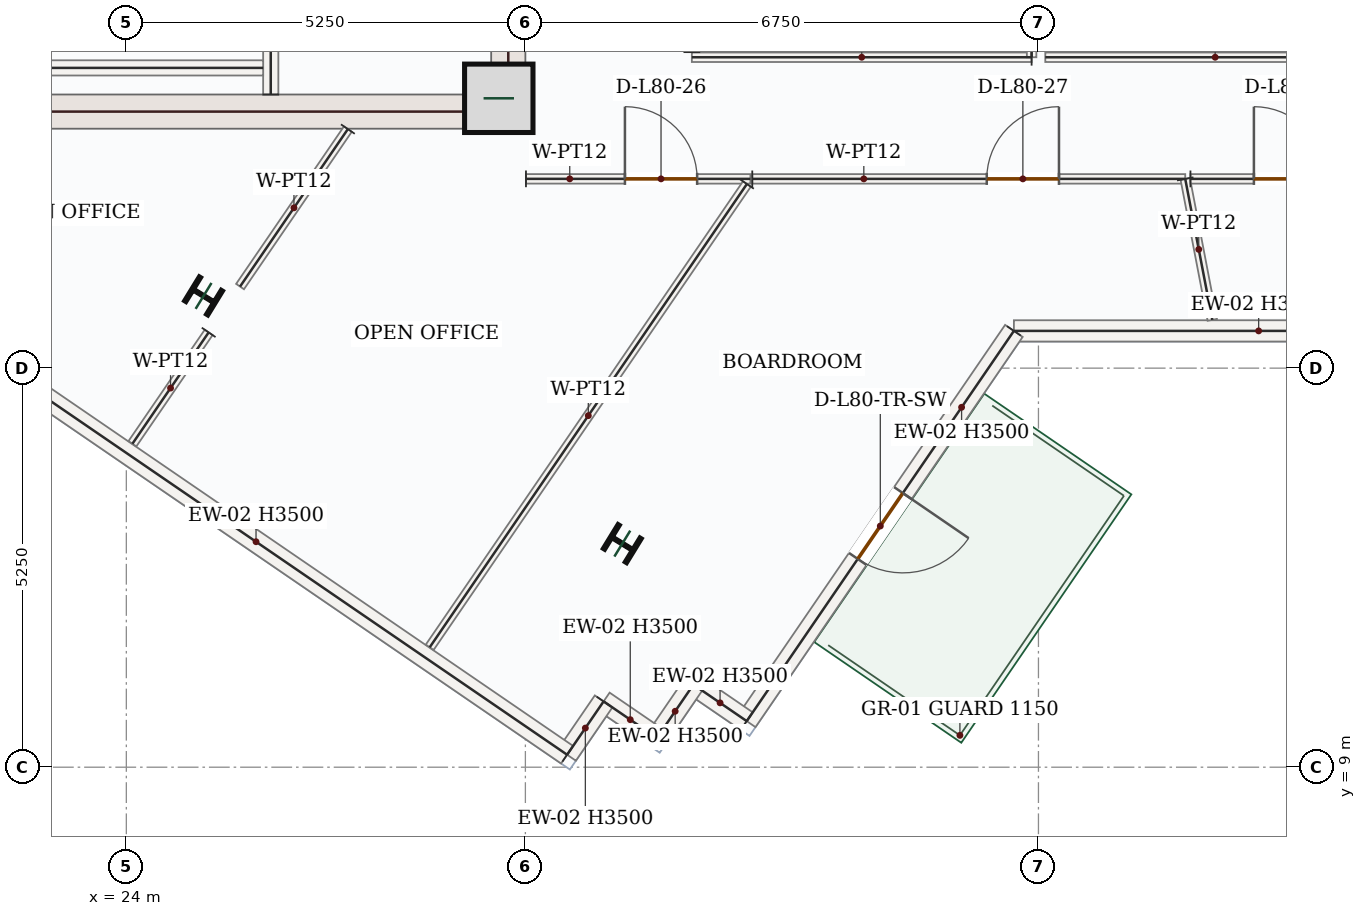
"""IFC4 building model, lengths in metres.
Left out: names, types, materials, properties, quantities, classifications, styles, units other than length and angle.
Written with IfcOpenShell. Run it as: python <this file> out.ifc"""

import sys

from ifc_helpers import new_model, si_unit, direction, frame, frame_2d, origin, origin_2d, place, context, subcontext, project, spatial, rectangle, i_section, extrude, source, transform, mapped, element, fill, save


model = new_model("IFC4")
c1 = context("Model", 3, precision=1e-05, world=origin(), true_north=direction((0.0, 1.0)))
c2 = subcontext(c1, "Body", "Model", "MODEL_VIEW")
j1 = project(units=[si_unit("LENGTHUNIT", "METRE"), si_unit("PLANEANGLEUNIT", "RADIAN")], contexts=[c1])
p1 = place(None, origin())
s1 = spatial("IfcSite", under=j1, at=p1, CompositionType="ELEMENT")
p2 = place(p1, origin())
s2 = spatial("IfcBuilding", under=s1, at=p2, CompositionType="ELEMENT")
p3 = place(p2, frame((0.0, 0.0, 331.05)))
s3 = spatial("IfcBuildingStorey", under=s2, at=p3, CompositionType="ELEMENT", Elevation=331.05)
p4 = place(p3, frame((29.025, 17.4, 0.0), z_axis=(0.0, 0.0, 1.0), x_axis=(0.0, 1.0, 0.0)))
e1 = element("IfcWall", 1, at=p4, inside=s3, PredefinedType="SHEAR", context=c2, shape_type="SweptSolid", body=[
    extrude(rectangle(XDim=8.55, YDim=0.45, at=frame_2d((4.275, 0.0))), origin(), (0.0, 0.0, 1.0), 3.5),
])
p5 = place(p4, frame((6.65, 0.0, 0.0)))
e2 = element("IfcOpeningElement", 2, at=p5, cuts=e1, PredefinedType="OPENING", context=c2, shape_type="SweptSolid", body=[
    extrude(rectangle(XDim=1.1, YDim=2.2, at=frame_2d((0.55, 1.1))), frame((0.0, 0.235, 0.0), z_axis=(0.0, -1.0, 0.0), x_axis=(1.0, 0.0, 0.0)), (0.0, 0.0, 1.0), 0.47),
])
p6 = place(p4, frame((2.15, 0.0, 0.0)))
e3 = element("IfcOpeningElement", 3, at=p6, cuts=e1, PredefinedType="OPENING", context=c2, shape_type="SweptSolid", body=[
    extrude(rectangle(XDim=0.88, YDim=2.1, at=frame_2d((0.44, 1.05))), frame((0.0, 0.235, 0.0), z_axis=(0.0, -1.0, 0.0), x_axis=(1.0, 0.0, 0.0)), (0.0, 0.0, 1.0), 0.47),
])
p7 = place(p4, frame((4.25, 0.0, 0.0)))
e4 = element("IfcOpeningElement", 4, at=p7, cuts=e1, PredefinedType="OPENING", context=c2, shape_type="SweptSolid", body=[
    extrude(rectangle(XDim=0.88, YDim=2.1, at=frame_2d((0.44, 1.05))), frame((0.0, 0.235, 0.0), z_axis=(0.0, -1.0, 0.0), x_axis=(1.0, 0.0, 0.0)), (0.0, 0.0, 1.0), 0.47),
])
m1 = source(origin(), c2, "Body", "SweptSolid", [
    extrude(rectangle(XDim=7.1, YDim=0.45, at=frame_2d((3.55, 0.0))), origin(), (0.0, 0.0, 1.0), 3.5),
])
p8 = place(p3, frame((21.7, 17.625, 0.0), z_axis=(0.0, 0.0, 1.0), x_axis=(1.0, 0.0, 0.0)))
e5 = element("IfcWall", 5, at=p8, inside=s3, PredefinedType="SHEAR", context=c2, shape_type="MappedRepresentation", body=[
    mapped(m1, transform((0.0, 0.0, 0.0), x_axis=(1.0, 0.0, 0.0), y_axis=(0.0, 1.0, 0.0), z_axis=(0.0, 0.0, 1.0), scale=1.0)),
])
m2 = source(origin(), c2, "Body", "SweptSolid", [
    extrude(rectangle(XDim=0.9, YDim=0.9, at=origin_2d()), origin(), (0.0, 0.0, 1.0), 3.75),
])
p9 = place(p3, frame((28.9, 17.8, 0.0), z_axis=(0.0, 0.0, 1.0), x_axis=(1.0, 0.0, 0.0)))
e6 = element("IfcColumn", 6, at=p9, inside=s3, PredefinedType="COLUMN", context=c2, shape_type="MappedRepresentation", body=[
    mapped(m2, transform((0.0, 0.0, 0.0), x_axis=(1.0, 0.0, 0.0), y_axis=(0.0, 1.0, 0.0), z_axis=(0.0, 0.0, 1.0), scale=1.0)),
])
m3 = source(origin(), c2, "Body", "SweptSolid", [
    extrude(i_section(OverallWidth=0.369, OverallDepth=0.356, WebThickness=0.011, FlangeThickness=0.018, FilletRadius=0.018, at=origin_2d()), origin(), (0.0, 0.0, 1.0), 3.75),
])
for number, where, z_axis, x_axis in (
    (7, (25.016, 15.2, 0.0), (0.0, 0.0, 1.0), (0.522, 0.853, 0.0)),
    (8, (30.525, 11.942, 0.0), (0.0, 0.0, 1.0), (0.522, 0.853, 0.0)),
):
    element("IfcColumn", number, at=place(p3, frame(where, z_axis=z_axis, x_axis=x_axis)), inside=s3, PredefinedType="COLUMN", context=c2, shape_type="MappedRepresentation", body=[
        mapped(m3, transform((0.0, 0.0, 0.0), x_axis=(1.0, 0.0, 0.0), y_axis=(0.0, 1.0, 0.0), z_axis=(0.0, 0.0, 1.0), scale=1.0)),
    ])
m4 = source(origin(), c2, "Body", "SweptSolid", [
    extrude(rectangle(XDim=6.44, YDim=0.28, at=frame_2d((3.22, 0.0))), origin(), (0.0, 0.0, 1.0), 3.5),
])
p10 = place(p3, frame((42.117, 14.74, 0.0), z_axis=(0.0, 0.0, 1.0), x_axis=(-1.0, 0.0, 0.0)))
e9 = element("IfcWall", 9, at=p10, inside=s3, PredefinedType="SOLIDWALL", context=c2, shape_type="MappedRepresentation", body=[
    mapped(m4, transform((0.0, 0.0, 0.0), x_axis=(1.0, 0.0, 0.0), y_axis=(0.0, 1.0, 0.0), z_axis=(0.0, 0.0, 1.0), scale=1.0)),
])
p11 = place(p3, frame((35.677, 14.74, 0.0), z_axis=(0.0, 0.0, 1.0), x_axis=(-0.564953982519, -0.825122413728, 0.0)))
e10 = element("IfcWall", 10, at=p11, inside=s3, PredefinedType="SOLIDWALL", context=c2, shape_type="SweptSolid", body=[
    extrude(rectangle(XDim=6.221, YDim=0.28, at=frame_2d((3.111, 0.0))), origin(), (0.0, 0.0, 1.0), 3.5),
])
p12 = place(p11, frame((2.586, 0.0, 0.0)))
e11 = element("IfcOpeningElement", 11, at=p12, cuts=e10, PredefinedType="OPENING", context=c2, shape_type="SweptSolid", body=[
    extrude(rectangle(XDim=1.05, YDim=2.15, at=frame_2d((0.525, 1.075))), frame((0.0, 0.15, 0.0), z_axis=(0.0, -1.0, 0.0), x_axis=(1.0, 0.0, 0.0)), (0.0, 0.0, 1.0), 0.3),
])
m5 = source(origin(), c2, "Body", "SweptSolid", [
    extrude(rectangle(XDim=0.85, YDim=0.28, at=frame_2d((0.425, 0.0))), origin(), (0.0, 0.0, 1.0), 3.5),
])
for number, where, z_axis, x_axis in (
    (12, (32.162, 9.606, 0.0), (0.0, 0.0, 1.0), (-0.825, 0.565, 0.0)),
    (13, (31.461, 10.087, 0.0), (0.0, 0.0, 1.0), (-0.565, -0.825, 0.0)),
    (14, (30.98, 9.385, 0.0), (0.0, 0.0, 1.0), (-0.825, 0.565, 0.0)),
):
    element("IfcWall", number, at=place(p3, frame(where, z_axis=z_axis, x_axis=x_axis)), inside=s3, PredefinedType="SOLIDWALL", context=c2, shape_type="MappedRepresentation", body=[
        mapped(m5, transform((0.0, 0.0, 0.0), x_axis=(1.0, 0.0, 0.0), y_axis=(0.0, 1.0, 0.0), z_axis=(0.0, 0.0, 1.0), scale=1.0)),
    ])
m6 = source(origin(), c2, "Body", "SweptSolid", [
    extrude(rectangle(XDim=0.85, YDim=0.28, at=frame_2d((0.425, 0.0))), origin(), (0.0, 0.0, 1.0), 3.5),
])
p13 = place(p3, frame((30.279, 9.865, 0.0), z_axis=(0.0, 0.0, 1.0), x_axis=(-0.565064897913, -0.825046459993, 0.0)))
e15 = element("IfcWall", 15, at=p13, inside=s3, PredefinedType="SOLIDWALL", context=c2, shape_type="MappedRepresentation", body=[
    mapped(m6, transform((0.0, 0.0, 0.0), x_axis=(1.0, 0.0, 0.0), y_axis=(0.0, 1.0, 0.0), z_axis=(0.0, 0.0, 1.0), scale=1.0)),
])
m7 = source(origin(), c2, "Body", "SweptSolid", [
    extrude(rectangle(XDim=9.92, YDim=0.28, at=frame_2d((4.96, 0.0))), origin(), (0.0, 0.0, 1.0), 3.5),
])
p14 = place(p3, frame((29.799, 9.164, 0.0), z_axis=(0.0, 0.0, 1.0), x_axis=(-0.825121888295, 0.56495474992, 0.0)))
e16 = element("IfcWall", 16, at=p14, inside=s3, PredefinedType="SOLIDWALL", context=c2, shape_type="MappedRepresentation", body=[
    mapped(m7, transform((0.0, 0.0, 0.0), x_axis=(1.0, 0.0, 0.0), y_axis=(0.0, 1.0, 0.0), z_axis=(0.0, 0.0, 1.0), scale=1.0)),
])
p15 = place(p3, frame((25.9, 17.85, 0.0), z_axis=(0.0, 0.0, 1.0), x_axis=(0.0, 1.0, 0.0)))
e17 = element("IfcWall", 17, at=p15, inside=s3, PredefinedType="SOLIDWALL", context=c2, shape_type="SweptSolid", body=[
    extrude(rectangle(XDim=8.0, YDim=0.2, at=frame_2d((4.0, 0.0))), origin(), (0.0, 0.0, 1.0), 3.5),
])
p16 = place(p15, frame((6.2, 0.0, 0.0)))
e18 = element("IfcOpeningElement", 18, at=p16, cuts=e17, PredefinedType="OPENING", context=c2, shape_type="SweptSolid", body=[
    extrude(rectangle(XDim=1.0, YDim=2.15, at=frame_2d((0.5, 1.075))), frame((0.0, 0.11, 0.0), z_axis=(0.0, -1.0, 0.0), x_axis=(1.0, 0.0, 0.0)), (0.0, 0.0, 1.0), 0.22),
])
p17 = place(p15, frame((0.6, 0.0, 0.0)))
e19 = element("IfcOpeningElement", 19, at=p17, cuts=e17, PredefinedType="OPENING", context=c2, shape_type="SweptSolid", body=[
    extrude(rectangle(XDim=0.88, YDim=2.1, at=frame_2d((0.44, 1.05))), frame((0.0, 0.11, 0.0), z_axis=(0.0, -1.0, 0.0), x_axis=(1.0, 0.0, 0.0)), (0.0, 0.0, 1.0), 0.22),
])
m8 = source(origin(), c2, "Body", "SweptSolid", [
    extrude(rectangle(XDim=3.25, YDim=0.2, at=frame_2d((1.625, 0.0))), origin(), (0.0, 0.0, 1.0), 3.5),
])
p18 = place(p3, frame((22.55, 18.2, 0.0), z_axis=(0.0, 0.0, 1.0), x_axis=(1.0, 0.0, 0.0)))
e20 = element("IfcWall", 20, at=p18, inside=s3, PredefinedType="SOLIDWALL", context=c2, shape_type="MappedRepresentation", body=[
    mapped(m8, transform((0.0, 0.0, 0.0), x_axis=(1.0, 0.0, 0.0), y_axis=(0.0, 1.0, 0.0), z_axis=(0.0, 0.0, 1.0), scale=1.0)),
])
m9 = source(origin(), c2, "Body", "SweptSolid", [
    extrude(rectangle(XDim=2.511, YDim=0.125, at=frame_2d((1.255, 0.0))), origin(), (0.0, 0.0, 1.0), 3.5),
])
p19 = place(p3, frame((26.915, 17.395, 0.0), z_axis=(0.0, 0.0, 1.0), x_axis=(-0.564980194272, -0.825104466162, 0.0)))
e21 = element("IfcWall", 21, at=p19, inside=s3, PredefinedType="PARTITIONING", context=c2, shape_type="MappedRepresentation", body=[
    mapped(m9, transform((0.0, 0.0, 0.0), x_axis=(1.0, 0.0, 0.0), y_axis=(0.0, 1.0, 0.0), z_axis=(0.0, 0.0, 1.0), scale=1.0)),
])
m10 = source(origin(), c2, "Body", "SweptSolid", [
    extrude(rectangle(XDim=1.775, YDim=0.125, at=frame_2d((0.888, 0.0))), origin(), (0.0, 0.0, 1.0), 3.5),
])
p20 = place(p3, frame((25.083, 14.72, 0.0), z_axis=(0.0, 0.0, 1.0), x_axis=(-0.56509798207, -0.825023800057, 0.0)))
e22 = element("IfcWall", 22, at=p20, inside=s3, PredefinedType="PARTITIONING", context=c2, shape_type="MappedRepresentation", body=[
    mapped(m10, transform((0.0, 0.0, 0.0), x_axis=(1.0, 0.0, 0.0), y_axis=(0.0, 1.0, 0.0), z_axis=(0.0, 0.0, 1.0), scale=1.0)),
])
p21 = place(p3, frame((29.258, 16.74, 0.0), z_axis=(0.0, 0.0, 1.0), x_axis=(0.999999996583, -8.2671957e-05, 0.0)))
e23 = element("IfcWall", 23, at=p21, inside=s3, PredefinedType="PARTITIONING", context=c2, shape_type="SweptSolid", body=[
    extrude(rectangle(XDim=2.953, YDim=0.125, at=frame_2d((1.477, 0.0))), origin(), (0.0, 0.0, 1.0), 3.5),
])
p22 = place(p21, frame((1.302, 0.0, 0.0)))
e24 = element("IfcOpeningElement", 24, at=p22, cuts=e23, PredefinedType="OPENING", context=c2, shape_type="SweptSolid", body=[
    extrude(rectangle(XDim=0.95, YDim=2.15, at=frame_2d((0.475, 1.075))), frame((0.0, 0.073, 0.0), z_axis=(0.0, -1.0, 0.0), x_axis=(1.0, 0.0, 0.0)), (0.0, 0.0, 1.0), 0.145),
])
m11 = source(origin(), c2, "Body", "SweptSolid", [
    extrude(rectangle(XDim=7.387, YDim=0.125, at=frame_2d((3.693, 0.0))), origin(), (0.0, 0.0, 1.0), 3.5),
])
p23 = place(p3, frame((32.165, 16.673, 0.0), z_axis=(0.0, 0.0, 1.0), x_axis=(-0.564969427755, -0.8251118383, 0.0)))
e25 = element("IfcWall", 25, at=p23, inside=s3, PredefinedType="PARTITIONING", context=c2, shape_type="MappedRepresentation", body=[
    mapped(m11, transform((0.0, 0.0, 0.0), x_axis=(1.0, 0.0, 0.0), y_axis=(0.0, 1.0, 0.0), z_axis=(0.0, 0.0, 1.0), scale=1.0)),
])
m12 = source(origin(), c2, "Body", "SweptSolid", [
    extrude(rectangle(XDim=4.47, YDim=0.125, at=frame_2d((2.235, 0.0))), origin(), (0.0, 0.0, 1.0), 3.5),
])
p24 = place(p3, frame((35.91, 18.34, 0.0), z_axis=(0.0, 0.0, 1.0), x_axis=(-1.0, 0.0, 0.0)))
e26 = element("IfcWall", 26, at=p24, inside=s3, PredefinedType="PARTITIONING", context=c2, shape_type="MappedRepresentation", body=[
    mapped(m12, transform((0.0, 0.0, 0.0), x_axis=(1.0, 0.0, 0.0), y_axis=(0.0, 1.0, 0.0), z_axis=(0.0, 0.0, 1.0), scale=1.0)),
])
m13 = source(origin(), c2, "Body", "SweptSolid", [
    extrude(rectangle(XDim=7.47, YDim=0.125, at=frame_2d((3.735, 0.0))), origin(), (0.0, 0.0, 1.0), 3.5),
])
p25 = place(p3, frame((35.91, 25.81, 0.0), z_axis=(0.0, 0.0, 1.0), x_axis=(0.0, -1.0, 0.0)))
e27 = element("IfcWall", 27, at=p25, inside=s3, PredefinedType="PARTITIONING", context=c2, shape_type="MappedRepresentation", body=[
    mapped(m13, transform((0.0, 0.0, 0.0), x_axis=(1.0, 0.0, 0.0), y_axis=(0.0, 1.0, 0.0), z_axis=(0.0, 0.0, 1.0), scale=1.0)),
])
p26 = place(p3, frame((40.56, 18.34, 0.0), z_axis=(0.0, 0.0, 1.0), x_axis=(-1.0, 0.0, 0.0)))
e28 = element("IfcWall", 28, at=p26, inside=s3, PredefinedType="PARTITIONING", context=c2, shape_type="MappedRepresentation", body=[
    mapped(m12, transform((0.0, 0.0, 0.0), x_axis=(1.0, 0.0, 0.0), y_axis=(0.0, 1.0, 0.0), z_axis=(0.0, 0.0, 1.0), scale=1.0)),
])
p27 = place(p3, frame((32.235, 16.74, 0.0), z_axis=(0.0, 0.0, 1.0), x_axis=(1.0, 0.0, 0.0)))
e29 = element("IfcWall", 29, at=p27, inside=s3, PredefinedType="PARTITIONING", context=c2, shape_type="SweptSolid", body=[
    extrude(rectangle(XDim=5.696, YDim=0.125, at=frame_2d((2.848, 0.0))), origin(), (0.0, 0.0, 1.0), 3.5),
])
p28 = place(p27, frame((3.085, 0.0, 0.0)))
e30 = element("IfcOpeningElement", 30, at=p28, cuts=e29, PredefinedType="OPENING", context=c2, shape_type="SweptSolid", body=[
    extrude(rectangle(XDim=0.95, YDim=2.15, at=frame_2d((0.475, 1.075))), frame((0.0, 0.073, 0.0), z_axis=(0.0, -1.0, 0.0), x_axis=(1.0, 0.0, 0.0)), (0.0, 0.0, 1.0), 0.145),
])
m14 = source(origin(), c2, "Body", "SweptSolid", [
    extrude(rectangle(XDim=1.889, YDim=0.125, at=frame_2d((0.944, 0.0))), origin(), (0.0, 0.0, 1.0), 3.5),
])
p29 = place(p3, frame((37.931, 16.74, 0.0), z_axis=(0.0, 0.0, 1.0), x_axis=(0.188454265316, -0.982081966989, 0.0)))
e31 = element("IfcWall", 31, at=p29, inside=s3, PredefinedType="PARTITIONING", context=c2, shape_type="MappedRepresentation", body=[
    mapped(m14, transform((0.0, 0.0, 0.0), x_axis=(1.0, 0.0, 0.0), y_axis=(0.0, 1.0, 0.0), z_axis=(0.0, 0.0, 1.0), scale=1.0)),
])
p30 = place(p3, frame((38.0, 16.74, 0.0), z_axis=(0.0, 0.0, 1.0), x_axis=(1.0, 0.0, 0.0)))
e32 = element("IfcWall", 32, at=p30, inside=s3, PredefinedType="PARTITIONING", context=c2, shape_type="SweptSolid", body=[
    extrude(rectangle(XDim=4.744, YDim=0.125, at=frame_2d((2.372, 0.0))), origin(), (0.0, 0.0, 1.0), 3.5),
])
p31 = place(p30, frame((0.835, 0.0, 0.0)))
e33 = element("IfcOpeningElement", 33, at=p31, cuts=e32, PredefinedType="OPENING", context=c2, shape_type="SweptSolid", body=[
    extrude(rectangle(XDim=0.95, YDim=2.15, at=frame_2d((0.475, 1.075))), frame((0.0, 0.073, 0.0), z_axis=(0.0, -1.0, 0.0), x_axis=(1.0, 0.0, 0.0)), (0.0, 0.0, 1.0), 0.145),
])
m15 = source(origin(), c2, "Body", "SweptSolid", [
    extrude(rectangle(XDim=1.05, YDim=2.15, at=frame_2d((0.525, 1.075))), frame((0.0, 0.025, 0.0), z_axis=(0.0, -1.0, 0.0), x_axis=(1.0, 0.0, 0.0)), (0.0, 0.0, 1.0), 0.05),
])
p32 = place(p12, origin())
e34 = element("IfcDoor", 34, at=p32, inside=s3, OperationType="SINGLE_SWING_LEFT", PredefinedType="DOOR", context=c2, shape_type="MappedRepresentation", body=[
    mapped(m15, transform((0.0, 0.0, 0.0), x_axis=(1.0, 0.0, 0.0), y_axis=(0.0, 1.0, 0.0), z_axis=(0.0, 0.0, 1.0), scale=1.0)),
])
fill(e11, e34)
m16 = source(origin(), c2, "Body", "SweptSolid", [
    extrude(rectangle(XDim=0.95, YDim=2.15, at=frame_2d((0.475, 1.075))), frame((0.0, 0.025, 0.0), z_axis=(0.0, -1.0, 0.0), x_axis=(1.0, 0.0, 0.0)), (0.0, 0.0, 1.0), 0.05),
])
p33 = place(p22, origin())
e35 = element("IfcDoor", 35, at=p33, inside=s3, OperationType="SINGLE_SWING_LEFT", PredefinedType="DOOR", context=c2, shape_type="MappedRepresentation", body=[
    mapped(m16, transform((0.0, 0.0, 0.0), x_axis=(1.0, 0.0, 0.0), y_axis=(0.0, 1.0, 0.0), z_axis=(0.0, 0.0, 1.0), scale=1.0)),
])
fill(e24, e35)
p34 = place(p28, origin())
e36 = element("IfcDoor", 36, at=p34, inside=s3, OperationType="SINGLE_SWING_RIGHT", PredefinedType="DOOR", context=c2, shape_type="MappedRepresentation", body=[
    mapped(m16, transform((0.0, 0.0, 0.0), x_axis=(1.0, 0.0, 0.0), y_axis=(0.0, 1.0, 0.0), z_axis=(0.0, 0.0, 1.0), scale=1.0)),
])
fill(e30, e36)
p35 = place(p31, origin())
e37 = element("IfcDoor", 37, at=p35, inside=s3, OperationType="SINGLE_SWING_LEFT", PredefinedType="DOOR", context=c2, shape_type="MappedRepresentation", body=[
    mapped(m16, transform((0.0, 0.0, 0.0), x_axis=(1.0, 0.0, 0.0), y_axis=(0.0, 1.0, 0.0), z_axis=(0.0, 0.0, 1.0), scale=1.0)),
])
fill(e33, e37)
save(model, sys.argv[1])
